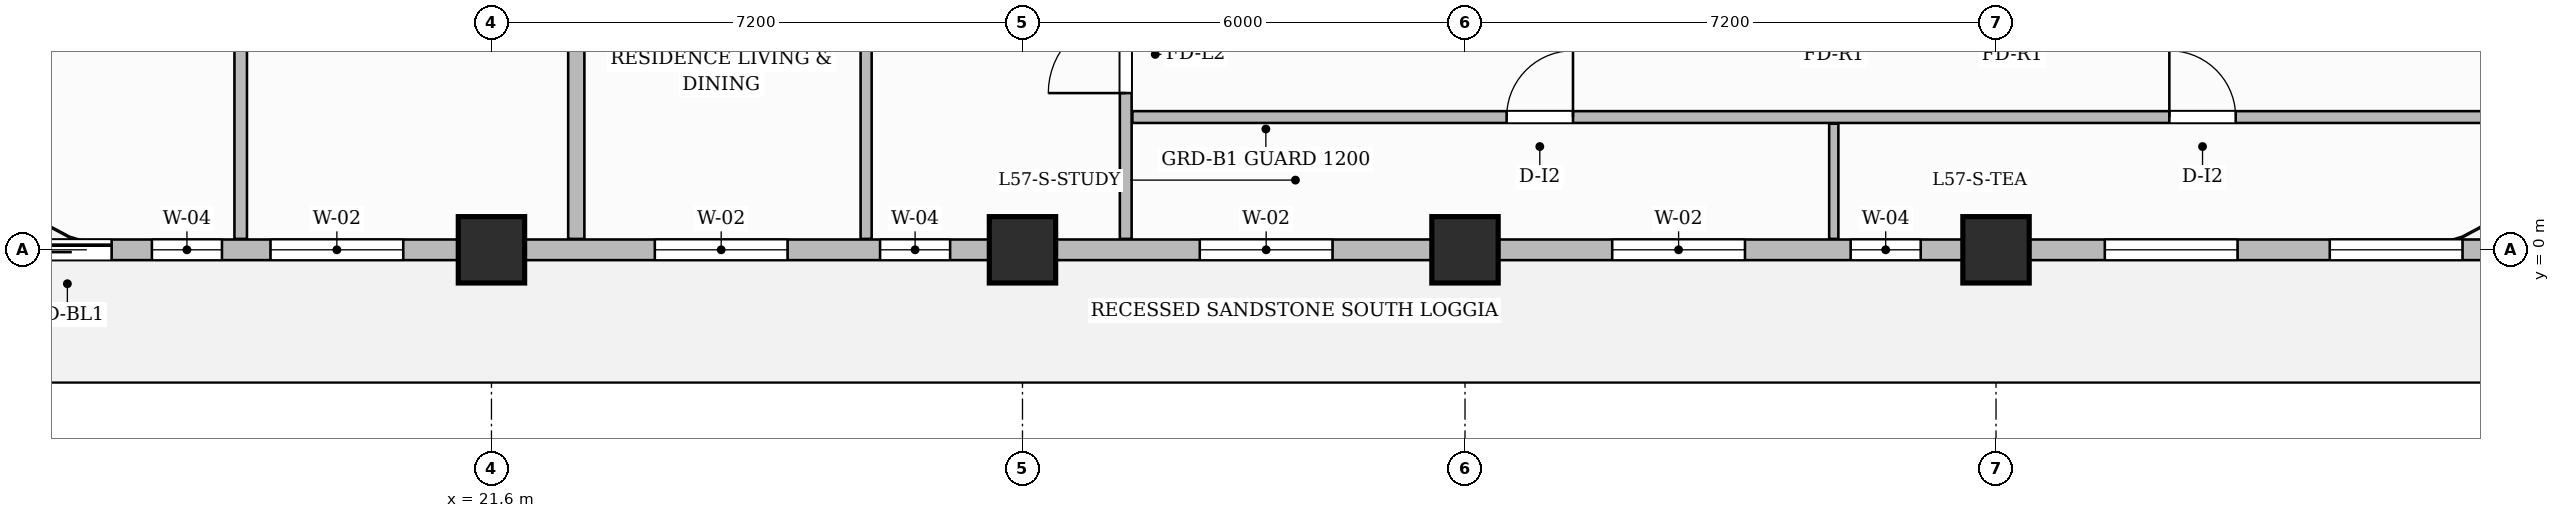
"""IFC4 building model, lengths in metres.
Left out: names, types, materials, properties, quantities, classifications, styles, units other than length and angle.
Written with IfcOpenShell. Run it as: python <this file> out.ifc"""

import sys

from ifc_helpers import new_model, si_unit, direction, frame, frame_2d, origin, origin_2d, place, context, subcontext, project, spatial, rectangle, extrude, source, transform, mapped, element, fill, save


model = new_model("IFC4")
c1 = context("Model", 3, precision=1e-05, world=origin(), true_north=direction((0.0, 1.0)))
c2 = subcontext(c1, "Body", "Model", "MODEL_VIEW")
j1 = project(units=[si_unit("LENGTHUNIT", "METRE"), si_unit("PLANEANGLEUNIT", "RADIAN")], contexts=[c1])
p1 = place(None, origin())
s1 = spatial("IfcSite", under=j1, at=p1, CompositionType="ELEMENT")
p2 = place(p1, origin())
s2 = spatial("IfcBuilding", under=s1, at=p2, CompositionType="ELEMENT")
p3 = place(p2, frame((0.0, 0.0, 228.85)))
s3 = spatial("IfcBuildingStorey", under=s2, at=p3, CompositionType="ELEMENT", Elevation=228.85)
m1 = source(origin(), c2, "Body", "SweptSolid", [
    extrude(rectangle(XDim=0.9, YDim=0.9, at=origin_2d()), origin(), (0.0, 0.0, 1.0), 3.85),
])
for number, where, z_axis, x_axis in (
    (1, (21.6, 0.0, 0.0), (0.0, 0.0, 1.0), (1.0, 0.0, 0.0)),
    (2, (28.8, 0.0, 0.0), (0.0, 0.0, 1.0), (1.0, 0.0, 0.0)),
    (3, (34.8, 0.0, 0.0), (0.0, 0.0, 1.0), (1.0, 0.0, 0.0)),
    (4, (42.0, 0.0, 0.0), (0.0, 0.0, 1.0), (1.0, 0.0, 0.0)),
):
    element("IfcColumn", number, at=place(p3, frame(where, z_axis=z_axis, x_axis=x_axis)), inside=s3, PredefinedType="COLUMN", context=c2, shape_type="MappedRepresentation", body=[
        mapped(m1, transform((0.0, 0.0, 0.0), scale=1.0)),
    ])
p4 = place(p3, frame((30.2, 0.148, 0.0), z_axis=(0.0, 0.0, 1.0), x_axis=(0.0, 1.0, 0.0)))
e5 = element("IfcWall", 5, at=p4, inside=s3, PredefinedType="PARTITIONING", context=c2, shape_type="SweptSolid", body=[
    extrude(rectangle(XDim=9.512, YDim=0.16, at=frame_2d((4.756, 0.0))), origin(), (0.0, 0.0, 1.0), 3.6),
])
p5 = place(p4, frame((1.977, 0.0, 0.0)))
e6 = element("IfcOpeningElement", 6, at=p5, cuts=e5, PredefinedType="OPENING", context=c2, shape_type="SweptSolid", body=[
    extrude(rectangle(XDim=1.05, YDim=2.15, at=frame_2d((0.525, 1.075))), frame((0.0, 0.09, 0.0), z_axis=(0.0, -1.0, 0.0), x_axis=(1.0, 0.0, 0.0)), (0.0, 0.0, 1.0), 0.18),
])
p6 = place(p3, frame((30.29, 1.8, 0.0), z_axis=(0.0, 0.0, 1.0), x_axis=(1.0, 0.0, 0.0)))
e7 = element("IfcWall", 7, at=p6, inside=s3, PredefinedType="PARTITIONING", context=c2, shape_type="SweptSolid", body=[
    extrude(rectangle(XDim=19.37, YDim=0.16, at=frame_2d((9.685, 0.0))), origin(), (0.0, 0.0, 1.0), 3.6),
])
p7 = place(p6, frame((5.074, 0.0, 0.0)))
e8 = element("IfcOpeningElement", 8, at=p7, cuts=e7, PredefinedType="OPENING", context=c2, shape_type="SweptSolid", body=[
    extrude(rectangle(XDim=0.9, YDim=2.15, at=frame_2d((0.45, 1.075))), frame((0.0, 0.09, 0.0), z_axis=(0.0, -1.0, 0.0), x_axis=(1.0, 0.0, 0.0)), (0.0, 0.0, 1.0), 0.18),
])
p8 = place(p6, frame((14.06, 0.0, 0.0)))
e9 = element("IfcOpeningElement", 9, at=p8, cuts=e7, PredefinedType="OPENING", context=c2, shape_type="SweptSolid", body=[
    extrude(rectangle(XDim=0.9, YDim=2.15, at=frame_2d((0.45, 1.075))), frame((0.0, 0.09, 0.0), z_axis=(0.0, -1.0, 0.0), x_axis=(1.0, 0.0, 0.0)), (0.0, 0.0, 1.0), 0.18),
])
p9 = place(p3, frame((39.8, 0.148, 0.0), z_axis=(0.0, 0.0, 1.0), x_axis=(0.0, 1.0, 0.0)))
e10 = element("IfcWall", 10, at=p9, inside=s3, PredefinedType="PARTITIONING", context=c2, shape_type="SweptSolid", body=[
    extrude(rectangle(XDim=1.562, YDim=0.125, at=frame_2d((0.781, 0.0))), origin(), (0.0, 0.0, 1.0), 3.6),
])
p10 = place(p3, frame((18.2, 0.148, 0.0), z_axis=(0.0, 0.0, 1.0), x_axis=(0.0, 1.0, 0.0)))
e11 = element("IfcWall", 11, at=p10, inside=s3, PredefinedType="PARTITIONING", context=c2, shape_type="SweptSolid", body=[
    extrude(rectangle(XDim=9.512, YDim=0.17, at=frame_2d((4.756, 0.0))), origin(), (0.0, 0.0, 1.0), 3.315),
])
p11 = place(p3, frame((22.75, 0.148, 0.0), z_axis=(0.0, 0.0, 1.0), x_axis=(0.0, 1.0, 0.0)))
e12 = element("IfcWall", 12, at=p11, inside=s3, PredefinedType="PARTITIONING", context=c2, shape_type="SweptSolid", body=[
    extrude(rectangle(XDim=9.512, YDim=0.22, at=frame_2d((4.756, 0.0))), origin(), (0.0, 0.0, 1.0), 3.6),
])
p12 = place(p3, frame((26.68, 0.148, 0.0), z_axis=(0.0, 0.0, 1.0), x_axis=(0.0, 1.0, 0.0)))
e13 = element("IfcWall", 13, at=p12, inside=s3, PredefinedType="PARTITIONING", context=c2, shape_type="SweptSolid", body=[
    extrude(rectangle(XDim=9.512, YDim=0.15, at=frame_2d((4.756, 0.0))), origin(), (0.0, 0.0, 1.0), 3.6),
])
p13 = place(p12, frame((8.077, 0.0, 0.0)))
e14 = element("IfcOpeningElement", 14, at=p13, cuts=e13, PredefinedType="OPENING", context=c2, shape_type="SweptSolid", body=[
    extrude(rectangle(XDim=0.9, YDim=2.15, at=frame_2d((0.45, 1.075))), frame((0.0, 0.085, 0.0), z_axis=(0.0, -1.0, 0.0), x_axis=(1.0, 0.0, 0.0)), (0.0, 0.0, 1.0), 0.17),
])
p14 = place(p3, frame((14.4, 0.0, 0.0), z_axis=(0.0, 0.0, 1.0), x_axis=(1.0, 0.0, 0.0)))
e15 = element("IfcWall", 15, at=p14, inside=s3, PredefinedType="SOLIDWALL", context=c2, shape_type="SweptSolid", body=[
    extrude(rectangle(XDim=35.4, YDim=0.28, at=frame_2d((17.7, 0.0))), origin(), (0.0, 0.0, 1.0), 3.135),
])
p15 = place(p14, frame((0.85, 0.0, 0.0)))
e16 = element("IfcOpeningElement", 16, at=p15, cuts=e15, PredefinedType="OPENING", context=c2, shape_type="SweptSolid", body=[
    extrude(rectangle(XDim=1.2, YDim=2.2, at=frame_2d((0.6, 1.1))), frame((0.0, 0.15, 0.0), z_axis=(0.0, -1.0, 0.0), x_axis=(1.0, 0.0, 0.0)), (0.0, 0.0, 1.0), 0.3),
])
p16 = place(p14, frame((2.596, 0.0, 0.8)))
e17 = element("IfcOpeningElement", 17, at=p16, cuts=e15, PredefinedType="OPENING", context=c2, shape_type="SweptSolid", body=[
    extrude(rectangle(XDim=0.95, YDim=1.75, at=frame_2d((0.475, 0.875))), frame((0.0, 0.15, 0.0), z_axis=(0.0, -1.0, 0.0), x_axis=(1.0, 0.0, 0.0)), (0.0, 0.0, 1.0), 0.3),
])
p17 = place(p14, frame((4.204, 0.0, 0.8)))
e18 = element("IfcOpeningElement", 18, at=p17, cuts=e15, PredefinedType="OPENING", context=c2, shape_type="SweptSolid", body=[
    extrude(rectangle(XDim=1.8, YDim=1.85, at=frame_2d((0.9, 0.925))), frame((0.0, 0.15, 0.0), z_axis=(0.0, -1.0, 0.0), x_axis=(1.0, 0.0, 0.0)), (0.0, 0.0, 1.0), 0.3),
])
p18 = place(p14, frame((9.415, 0.0, 0.8)))
e19 = element("IfcOpeningElement", 19, at=p18, cuts=e15, PredefinedType="OPENING", context=c2, shape_type="SweptSolid", body=[
    extrude(rectangle(XDim=1.8, YDim=1.85, at=frame_2d((0.9, 0.925))), frame((0.0, 0.15, 0.0), z_axis=(0.0, -1.0, 0.0), x_axis=(1.0, 0.0, 0.0)), (0.0, 0.0, 1.0), 0.3),
])
p19 = place(p14, frame((12.469, 0.0, 0.8)))
e20 = element("IfcOpeningElement", 20, at=p19, cuts=e15, PredefinedType="OPENING", context=c2, shape_type="SweptSolid", body=[
    extrude(rectangle(XDim=0.95, YDim=1.75, at=frame_2d((0.475, 0.875))), frame((0.0, 0.15, 0.0), z_axis=(0.0, -1.0, 0.0), x_axis=(1.0, 0.0, 0.0)), (0.0, 0.0, 1.0), 0.3),
])
p20 = place(p14, frame((16.804, 0.0, 0.8)))
e21 = element("IfcOpeningElement", 21, at=p20, cuts=e15, PredefinedType="OPENING", context=c2, shape_type="SweptSolid", body=[
    extrude(rectangle(XDim=1.8, YDim=1.85, at=frame_2d((0.9, 0.925))), frame((0.0, 0.15, 0.0), z_axis=(0.0, -1.0, 0.0), x_axis=(1.0, 0.0, 0.0)), (0.0, 0.0, 1.0), 0.3),
])
p21 = place(p14, frame((22.396, 0.0, 0.8)))
e22 = element("IfcOpeningElement", 22, at=p21, cuts=e15, PredefinedType="OPENING", context=c2, shape_type="SweptSolid", body=[
    extrude(rectangle(XDim=1.8, YDim=1.85, at=frame_2d((0.9, 0.925))), frame((0.0, 0.15, 0.0), z_axis=(0.0, -1.0, 0.0), x_axis=(1.0, 0.0, 0.0)), (0.0, 0.0, 1.0), 0.3),
])
p22 = place(p14, frame((25.629, 0.0, 0.8)))
e23 = element("IfcOpeningElement", 23, at=p22, cuts=e15, PredefinedType="OPENING", context=c2, shape_type="SweptSolid", body=[
    extrude(rectangle(XDim=0.95, YDim=1.75, at=frame_2d((0.475, 0.875))), frame((0.0, 0.15, 0.0), z_axis=(0.0, -1.0, 0.0), x_axis=(1.0, 0.0, 0.0)), (0.0, 0.0, 1.0), 0.3),
])
p23 = place(p14, frame((29.075, 0.0, 0.8)))
e24 = element("IfcOpeningElement", 24, at=p23, cuts=e15, PredefinedType="OPENING", context=c2, shape_type="SweptSolid", body=[
    extrude(rectangle(XDim=1.8, YDim=1.85, at=frame_2d((0.9, 0.925))), frame((0.0, 0.15, 0.0), z_axis=(0.0, -1.0, 0.0), x_axis=(1.0, 0.0, 0.0)), (0.0, 0.0, 1.0), 0.3),
])
p24 = place(p14, frame((32.125, 0.0, 0.8)))
e25 = element("IfcOpeningElement", 25, at=p24, cuts=e15, PredefinedType="OPENING", context=c2, shape_type="SweptSolid", body=[
    extrude(rectangle(XDim=1.8, YDim=1.85, at=frame_2d((0.9, 0.925))), frame((0.0, 0.15, 0.0), z_axis=(0.0, -1.0, 0.0), x_axis=(1.0, 0.0, 0.0)), (0.0, 0.0, 1.0), 0.3),
])
m2 = source(origin(), c2, "Body", "SweptSolid", [
    extrude(rectangle(XDim=1.05, YDim=2.15, at=frame_2d((0.525, 1.075))), frame((0.0, 0.025, 0.0), z_axis=(0.0, -1.0, 0.0), x_axis=(1.0, 0.0, 0.0)), (0.0, 0.0, 1.0), 0.05),
])
p25 = place(p5, origin())
e26 = element("IfcDoor", 26, at=p25, inside=s3, OperationType="SINGLE_SWING_LEFT", PredefinedType="DOOR", context=c2, shape_type="MappedRepresentation", body=[
    mapped(m2, transform((0.0, 0.0, 0.0), scale=1.0)),
])
fill(e6, e26)
m3 = source(origin(), c2, "Body", "SweptSolid", [
    extrude(rectangle(XDim=0.9, YDim=2.15, at=frame_2d((0.45, 1.075))), frame((0.0, 0.025, 0.0), z_axis=(0.0, -1.0, 0.0), x_axis=(1.0, 0.0, 0.0)), (0.0, 0.0, 1.0), 0.05),
])
p26 = place(p7, origin())
e27 = element("IfcDoor", 27, at=p26, inside=s3, OperationType="SINGLE_SWING_RIGHT", PredefinedType="DOOR", context=c2, shape_type="MappedRepresentation", body=[
    mapped(m3, transform((0.0, 0.0, 0.0), scale=1.0)),
])
fill(e8, e27)
p27 = place(p8, origin())
e28 = element("IfcDoor", 28, at=p27, inside=s3, OperationType="SINGLE_SWING_LEFT", PredefinedType="DOOR", context=c2, shape_type="MappedRepresentation", body=[
    mapped(m3, transform((0.0, 0.0, 0.0), scale=1.0)),
])
fill(e9, e28)
m4 = source(origin(), c2, "Body", "SweptSolid", [
    extrude(rectangle(XDim=1.2, YDim=2.2, at=frame_2d((0.6, 1.1))), frame((0.0, 0.025, 0.0), z_axis=(0.0, -1.0, 0.0), x_axis=(1.0, 0.0, 0.0)), (0.0, 0.0, 1.0), 0.05),
])
p28 = place(p15, origin())
e29 = element("IfcDoor", 29, at=p28, inside=s3, OperationType="SLIDING_TO_LEFT", PredefinedType="DOOR", context=c2, shape_type="MappedRepresentation", body=[
    mapped(m4, transform((0.0, 0.0, 0.0), scale=1.0)),
])
fill(e16, e29)
m5 = source(origin(), c2, "Body", "SweptSolid", [
    extrude(rectangle(XDim=0.95, YDim=1.75, at=frame_2d((0.475, 0.875))), frame((0.0, 0.03, 0.0), z_axis=(0.0, -1.0, 0.0), x_axis=(1.0, 0.0, 0.0)), (0.0, 0.0, 1.0), 0.06),
])
p29 = place(p16, origin())
e30 = element("IfcWindow", 30, at=p29, inside=s3, PartitioningType="SINGLE_PANEL", PredefinedType="WINDOW", context=c2, shape_type="MappedRepresentation", body=[
    mapped(m5, transform((0.0, 0.0, 0.0), scale=1.0)),
])
fill(e17, e30)
m6 = source(origin(), c2, "Body", "SweptSolid", [
    extrude(rectangle(XDim=1.8, YDim=1.85, at=frame_2d((0.9, 0.925))), frame((0.0, 0.03, 0.0), z_axis=(0.0, -1.0, 0.0), x_axis=(1.0, 0.0, 0.0)), (0.0, 0.0, 1.0), 0.06),
])
p30 = place(p17, origin())
e31 = element("IfcWindow", 31, at=p30, inside=s3, PartitioningType="DOUBLE_PANEL_VERTICAL", PredefinedType="WINDOW", context=c2, shape_type="MappedRepresentation", body=[
    mapped(m6, transform((0.0, 0.0, 0.0), scale=1.0)),
])
fill(e18, e31)
p31 = place(p18, origin())
e32 = element("IfcWindow", 32, at=p31, inside=s3, PartitioningType="DOUBLE_PANEL_VERTICAL", PredefinedType="WINDOW", context=c2, shape_type="MappedRepresentation", body=[
    mapped(m6, transform((0.0, 0.0, 0.0), scale=1.0)),
])
fill(e19, e32)
p32 = place(p19, origin())
e33 = element("IfcWindow", 33, at=p32, inside=s3, PartitioningType="SINGLE_PANEL", PredefinedType="WINDOW", context=c2, shape_type="MappedRepresentation", body=[
    mapped(m5, transform((0.0, 0.0, 0.0), scale=1.0)),
])
fill(e20, e33)
p33 = place(p20, origin())
e34 = element("IfcWindow", 34, at=p33, inside=s3, PartitioningType="DOUBLE_PANEL_VERTICAL", PredefinedType="WINDOW", context=c2, shape_type="MappedRepresentation", body=[
    mapped(m6, transform((0.0, 0.0, 0.0), scale=1.0)),
])
fill(e21, e34)
p34 = place(p21, origin())
e35 = element("IfcWindow", 35, at=p34, inside=s3, PartitioningType="DOUBLE_PANEL_VERTICAL", PredefinedType="WINDOW", context=c2, shape_type="MappedRepresentation", body=[
    mapped(m6, transform((0.0, 0.0, 0.0), scale=1.0)),
])
fill(e22, e35)
p35 = place(p22, origin())
e36 = element("IfcWindow", 36, at=p35, inside=s3, PartitioningType="SINGLE_PANEL", PredefinedType="WINDOW", context=c2, shape_type="MappedRepresentation", body=[
    mapped(m5, transform((0.0, 0.0, 0.0), scale=1.0)),
])
fill(e23, e36)
p36 = place(p23, origin())
e37 = element("IfcWindow", 37, at=p36, inside=s3, PartitioningType="DOUBLE_PANEL_VERTICAL", PredefinedType="WINDOW", context=c2, shape_type="MappedRepresentation", body=[
    mapped(m6, transform((0.0, 0.0, 0.0), scale=1.0)),
])
fill(e24, e37)
p37 = place(p24, origin())
e38 = element("IfcWindow", 38, at=p37, inside=s3, PartitioningType="DOUBLE_PANEL_VERTICAL", PredefinedType="WINDOW", context=c2, shape_type="MappedRepresentation", body=[
    mapped(m6, transform((0.0, 0.0, 0.0), scale=1.0)),
])
fill(e25, e38)
save(model, sys.argv[1])
